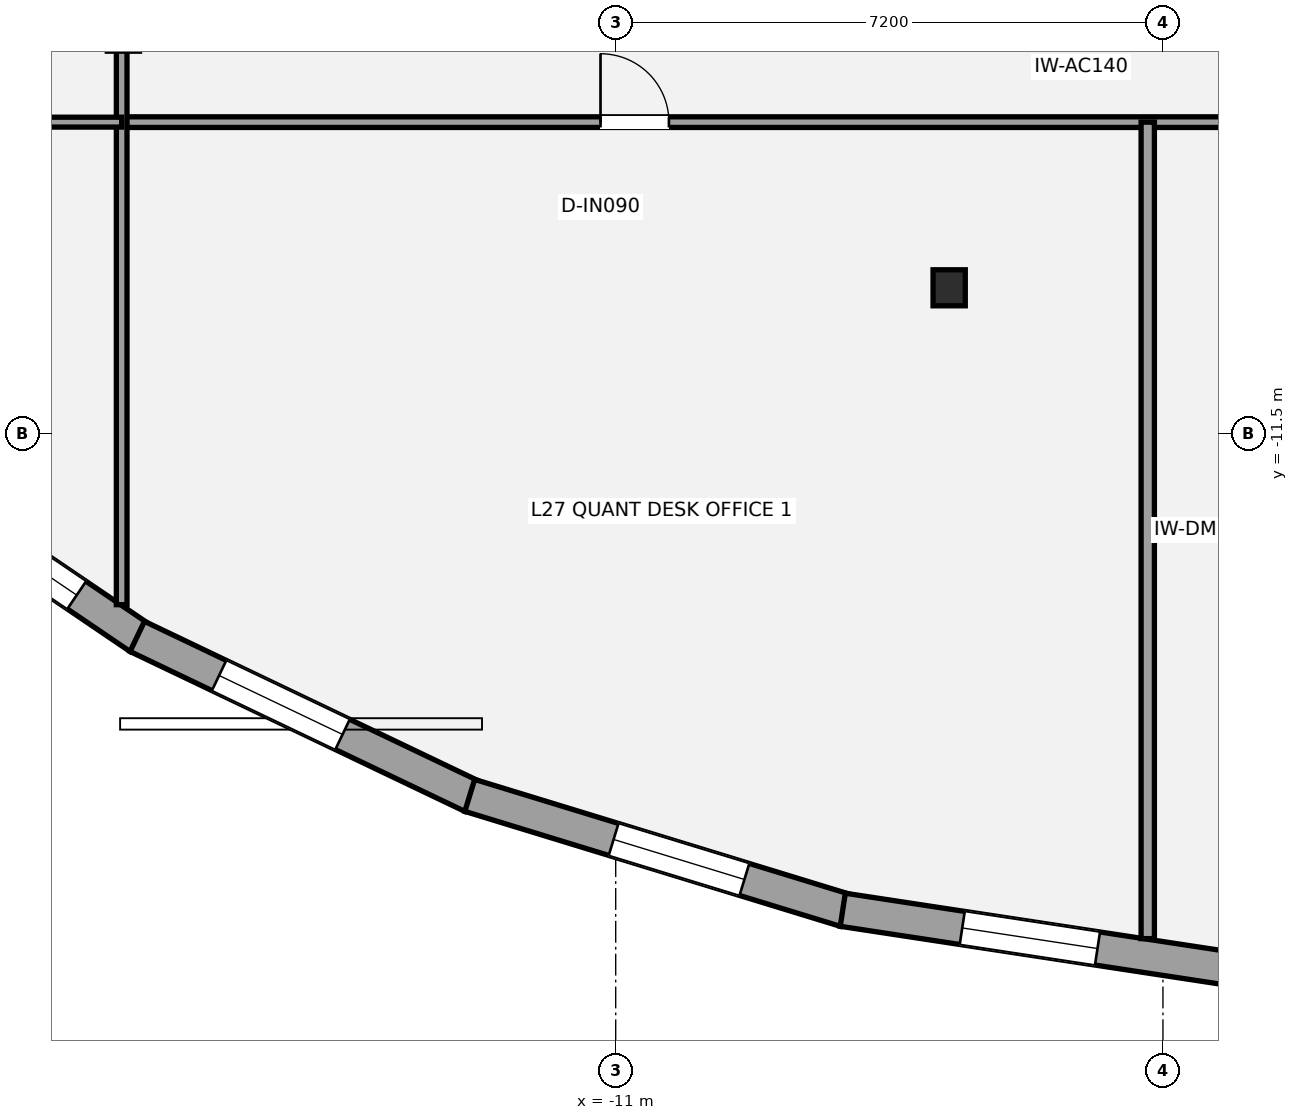
"""IFC4 building model, lengths in metres.
Left out: names, types, materials, properties, quantities, classifications, styles, units other than length and angle.
Written with IfcOpenShell. Run it as: python <this file> out.ifc"""

import sys

from ifc_helpers import new_model, si_unit, direction, frame, frame_2d, origin, origin_2d, place, context, subcontext, project, spatial, rectangle, i_section, extrude, element, fill, save


model = new_model("IFC4")
c1 = context("Model", 3, precision=1e-05, world=origin(), true_north=direction((0.0, 1.0)))
c2 = subcontext(c1, "Body", "Model", "MODEL_VIEW")
j1 = project(units=[si_unit("LENGTHUNIT", "METRE"), si_unit("PLANEANGLEUNIT", "RADIAN")], contexts=[c1])
p1 = place(None, origin())
s1 = spatial("IfcSite", under=j1, at=p1, CompositionType="ELEMENT")
p2 = place(p1, origin())
s2 = spatial("IfcBuilding", under=s1, at=p2, CompositionType="ELEMENT")
p3 = place(p2, frame((0.0, 0.0, 103.6)))
s3 = spatial("IfcBuildingStorey", under=s2, at=p3, CompositionType="ELEMENT", Elevation=103.6)
p4 = place(p3, frame((-6.613, -9.579, 0.0), z_axis=(0.0, 0.0, 1.0), x_axis=(1.0, 0.0, 0.0)))
e1 = element("IfcColumn", 1, at=p4, inside=s3, PredefinedType="COLUMN", context=c2, shape_type="SweptSolid", body=[
    extrude(i_section(OverallWidth=0.424, OverallDepth=0.474, WebThickness=0.048, FlangeThickness=0.077, at=origin_2d()), origin(), (0.0, 0.0, 1.0), 3.5),
])
p5 = place(p3, frame((-17.266, -14.182, 0.0), z_axis=(0.0, 0.0, 1.0), x_axis=(-0.827754551165, 0.56109036975, 0.0)))
e2 = element("IfcWall", 2, at=p5, inside=s3, PredefinedType="STANDARD", context=c2, shape_type="SweptSolid", body=[
    extrude(rectangle(XDim=4.591, YDim=0.44, at=frame_2d((2.295, 0.0))), origin(), (0.0, 0.0, 1.0), 2.528),
])
p6 = place(p5, frame((0.997, 0.0, 0.65)))
e3 = element("IfcOpeningElement", 3, at=p6, cuts=e2, PredefinedType="OPENING", context=c2, shape_type="SweptSolid", body=[
    extrude(rectangle(XDim=1.8, YDim=1.7, at=frame_2d((0.9, 0.85))), frame((0.0, 0.23, 0.0), z_axis=(0.0, -1.0, 0.0), x_axis=(1.0, 0.0, 0.0)), (0.0, 0.0, 1.0), 0.46),
])
p7 = place(p3, frame((-12.89, -16.27, 0.0), z_axis=(0.0, 0.0, 1.0), x_axis=(-0.902372757907, 0.430956385018, 0.0)))
e4 = element("IfcWall", 4, at=p7, inside=s3, PredefinedType="STANDARD", context=c2, shape_type="SweptSolid", body=[
    extrude(rectangle(XDim=4.882, YDim=0.44, at=frame_2d((2.441, 0.0))), origin(), (0.0, 0.0, 1.0), 2.528),
])
p8 = place(p7, frame((1.888, 0.0, 0.65)))
e5 = element("IfcOpeningElement", 5, at=p8, cuts=e4, PredefinedType="OPENING", context=c2, shape_type="SweptSolid", body=[
    extrude(rectangle(XDim=1.8, YDim=1.7, at=frame_2d((0.9, 0.85))), frame((0.0, 0.23, 0.0), z_axis=(0.0, -1.0, 0.0), x_axis=(1.0, 0.0, 0.0)), (0.0, 0.0, 1.0), 0.46),
])
p9 = place(p3, frame((-7.981, -17.769, 0.0), z_axis=(0.0, 0.0, 1.0), x_axis=(-0.956228569431, 0.292620783617, 0.0)))
e6 = element("IfcWall", 6, at=p9, inside=s3, PredefinedType="STANDARD", context=c2, shape_type="SweptSolid", body=[
    extrude(rectangle(XDim=5.165, YDim=0.44, at=frame_2d((2.583, 0.0))), origin(), (0.0, 0.0, 1.0), 2.528),
])
p10 = place(p9, frame((1.386, 0.0, 0.65)))
e7 = element("IfcOpeningElement", 7, at=p10, cuts=e6, PredefinedType="OPENING", context=c2, shape_type="SweptSolid", body=[
    extrude(rectangle(XDim=1.8, YDim=1.7, at=frame_2d((0.9, 0.85))), frame((0.0, 0.23, 0.0), z_axis=(0.0, -1.0, 0.0), x_axis=(1.0, 0.0, 0.0)), (0.0, 0.0, 1.0), 0.46),
])
p11 = place(p3, frame((-2.697, -18.571, 0.0), z_axis=(0.0, 0.0, 1.0), x_axis=(-0.988627497469, 0.150385076545, 0.0)))
e8 = element("IfcWall", 8, at=p11, inside=s3, PredefinedType="STANDARD", context=c2, shape_type="SweptSolid", body=[
    extrude(rectangle(XDim=5.377, YDim=0.44, at=frame_2d((2.688, 0.0))), origin(), (0.0, 0.0, 1.0), 2.528),
])
p12 = place(p11, frame((1.987, 0.0, 0.65)))
e9 = element("IfcOpeningElement", 9, at=p12, cuts=e8, PredefinedType="OPENING", context=c2, shape_type="SweptSolid", body=[
    extrude(rectangle(XDim=1.8, YDim=1.7, at=frame_2d((0.9, 0.85))), frame((0.0, 0.23, 0.0), z_axis=(0.0, -1.0, 0.0), x_axis=(1.0, 0.0, 0.0)), (0.0, 0.0, 1.0), 0.46),
])
p13 = place(p3, frame((-17.5, -7.4, 0.0), z_axis=(0.0, 0.0, 1.0), x_axis=(1.0, 0.0, 0.0)))
e10 = element("IfcWall", 10, at=p13, inside=s3, PredefinedType="PARTITIONING", context=c2, shape_type="SweptSolid", body=[
    extrude(rectangle(XDim=33.2, YDim=0.14, at=frame_2d((16.6, 0.0))), origin(), (0.0, 0.0, 1.0), 2.688),
])
p14 = place(p13, frame((6.3, 0.0, 0.0)))
e11 = element("IfcOpeningElement", 11, at=p14, cuts=e10, PredefinedType="OPENING", context=c2, shape_type="SweptSolid", body=[
    extrude(rectangle(XDim=0.9, YDim=2.1, at=frame_2d((0.45, 1.05))), frame((0.0, 0.08, 0.0), z_axis=(0.0, -1.0, 0.0), x_axis=(1.0, 0.0, 0.0)), (0.0, 0.0, 1.0), 0.16),
])
p15 = place(p13, frame((18.05, 0.0, 0.0)))
e12 = element("IfcOpeningElement", 12, at=p15, cuts=e10, PredefinedType="OPENING", context=c2, shape_type="SweptSolid", body=[
    extrude(rectangle(XDim=0.9, YDim=2.1, at=frame_2d((0.45, 1.05))), frame((0.0, 0.08, 0.0), z_axis=(0.0, -1.0, 0.0), x_axis=(1.0, 0.0, 0.0)), (0.0, 0.0, 1.0), 0.16),
])
p16 = place(p13, frame((27.9, 0.0, 0.0)))
e13 = element("IfcOpeningElement", 13, at=p16, cuts=e10, PredefinedType="OPENING", context=c2, shape_type="SweptSolid", body=[
    extrude(rectangle(XDim=0.9, YDim=2.1, at=frame_2d((0.45, 1.05))), frame((0.0, 0.08, 0.0), z_axis=(0.0, -1.0, 0.0), x_axis=(1.0, 0.0, 0.0)), (0.0, 0.0, 1.0), 0.16),
])
p17 = place(p3, frame((-17.5, -13.748, 0.0), z_axis=(0.0, 0.0, 1.0), x_axis=(0.0, 1.0, 0.0)))
e14 = element("IfcWall", 14, at=p17, inside=s3, PredefinedType="PARTITIONING", context=c2, shape_type="SweptSolid", body=[
    extrude(rectangle(XDim=21.298, YDim=0.14, at=frame_2d((10.649, 0.0))), origin(), (0.0, 0.0, 1.0), 2.688),
])
p18 = place(p17, frame((10.499, 0.0, 0.0)))
e15 = element("IfcOpeningElement", 15, at=p18, cuts=e14, PredefinedType="OPENING", context=c2, shape_type="SweptSolid", body=[
    extrude(rectangle(XDim=0.9, YDim=2.1, at=frame_2d((0.45, 1.05))), frame((0.0, 0.08, 0.0), z_axis=(0.0, -1.0, 0.0), x_axis=(1.0, 0.0, 0.0)), (0.0, 0.0, 1.0), 0.16),
])
p19 = place(p17, frame((17.974, 0.0, 0.0)))
e16 = element("IfcOpeningElement", 16, at=p19, cuts=e14, PredefinedType="OPENING", context=c2, shape_type="SweptSolid", body=[
    extrude(rectangle(XDim=0.9, YDim=2.1, at=frame_2d((0.45, 1.05))), frame((0.0, 0.08, 0.0), z_axis=(0.0, -1.0, 0.0), x_axis=(1.0, 0.0, 0.0)), (0.0, 0.0, 1.0), 0.16),
])
p20 = place(p3, frame((-4.0, -18.142, 0.0), z_axis=(0.0, 0.0, 1.0), x_axis=(0.0, 1.0, 0.0)))
e17 = element("IfcWall", 17, at=p20, inside=s3, PredefinedType="PARTITIONING", context=c2, shape_type="SweptSolid", body=[
    extrude(rectangle(XDim=10.742, YDim=0.175, at=frame_2d((5.371, 0.0))), origin(), (0.0, 0.0, 1.0), 2.763),
])
p21 = place(p3, frame((-24.689, -7.4, 0.0), z_axis=(0.0, 0.0, 1.0), x_axis=(1.0, 0.0, 0.0)))
e18 = element("IfcWall", 18, at=p21, inside=s3, PredefinedType="PARTITIONING", context=c2, shape_type="SweptSolid", body=[
    extrude(rectangle(XDim=7.189, YDim=0.13, at=frame_2d((3.594, 0.0))), origin(), (0.0, 0.0, 1.0), 2.763),
])
p22 = place(p21, frame((0.63, 0.0, 0.0)))
e19 = element("IfcOpeningElement", 19, at=p22, cuts=e18, PredefinedType="OPENING", context=c2, shape_type="SweptSolid", body=[
    extrude(rectangle(XDim=0.9, YDim=2.1, at=frame_2d((0.45, 1.05))), frame((0.0, 0.075, 0.0), z_axis=(0.0, -1.0, 0.0), x_axis=(1.0, 0.0, 0.0)), (0.0, 0.0, 1.0), 0.15),
])
p23 = place(p6, origin())
e20 = element("IfcWindow", 20, at=p23, inside=s3, PartitioningType="SINGLE_PANEL", PredefinedType="WINDOW", context=c2, shape_type="SweptSolid", body=[
    extrude(rectangle(XDim=1.8, YDim=1.7, at=frame_2d((0.9, 0.85))), frame((0.0, -0.01, 0.0), z_axis=(0.0, -1.0, 0.0), x_axis=(1.0, 0.0, 0.0)), (0.0, 0.0, 1.0), 0.06),
])
fill(e3, e20)
p24 = place(p8, origin())
e21 = element("IfcWindow", 21, at=p24, inside=s3, PartitioningType="SINGLE_PANEL", PredefinedType="WINDOW", context=c2, shape_type="SweptSolid", body=[
    extrude(rectangle(XDim=1.8, YDim=1.7, at=frame_2d((0.9, 0.85))), frame((0.0, -0.01, 0.0), z_axis=(0.0, -1.0, 0.0), x_axis=(1.0, 0.0, 0.0)), (0.0, 0.0, 1.0), 0.06),
])
fill(e5, e21)
p25 = place(p10, origin())
e22 = element("IfcWindow", 22, at=p25, inside=s3, PartitioningType="SINGLE_PANEL", PredefinedType="WINDOW", context=c2, shape_type="SweptSolid", body=[
    extrude(rectangle(XDim=1.8, YDim=1.7, at=frame_2d((0.9, 0.85))), frame((0.0, -0.01, 0.0), z_axis=(0.0, -1.0, 0.0), x_axis=(1.0, 0.0, 0.0)), (0.0, 0.0, 1.0), 0.06),
])
fill(e7, e22)
p26 = place(p12, origin())
e23 = element("IfcWindow", 23, at=p26, inside=s3, PartitioningType="SINGLE_PANEL", PredefinedType="WINDOW", context=c2, shape_type="SweptSolid", body=[
    extrude(rectangle(XDim=1.8, YDim=1.7, at=frame_2d((0.9, 0.85))), frame((0.0, -0.01, 0.0), z_axis=(0.0, -1.0, 0.0), x_axis=(1.0, 0.0, 0.0)), (0.0, 0.0, 1.0), 0.06),
])
fill(e9, e23)
p27 = place(p14, origin())
e24 = element("IfcDoor", 24, at=p27, inside=s3, OperationType="SINGLE_SWING_LEFT", PredefinedType="DOOR", context=c2, shape_type="SweptSolid", body=[
    extrude(rectangle(XDim=0.9, YDim=2.1, at=frame_2d((0.45, 1.05))), frame((0.0, 0.025, 0.0), z_axis=(0.0, -1.0, 0.0), x_axis=(1.0, 0.0, 0.0)), (0.0, 0.0, 1.0), 0.05),
])
fill(e11, e24)
save(model, sys.argv[1])
